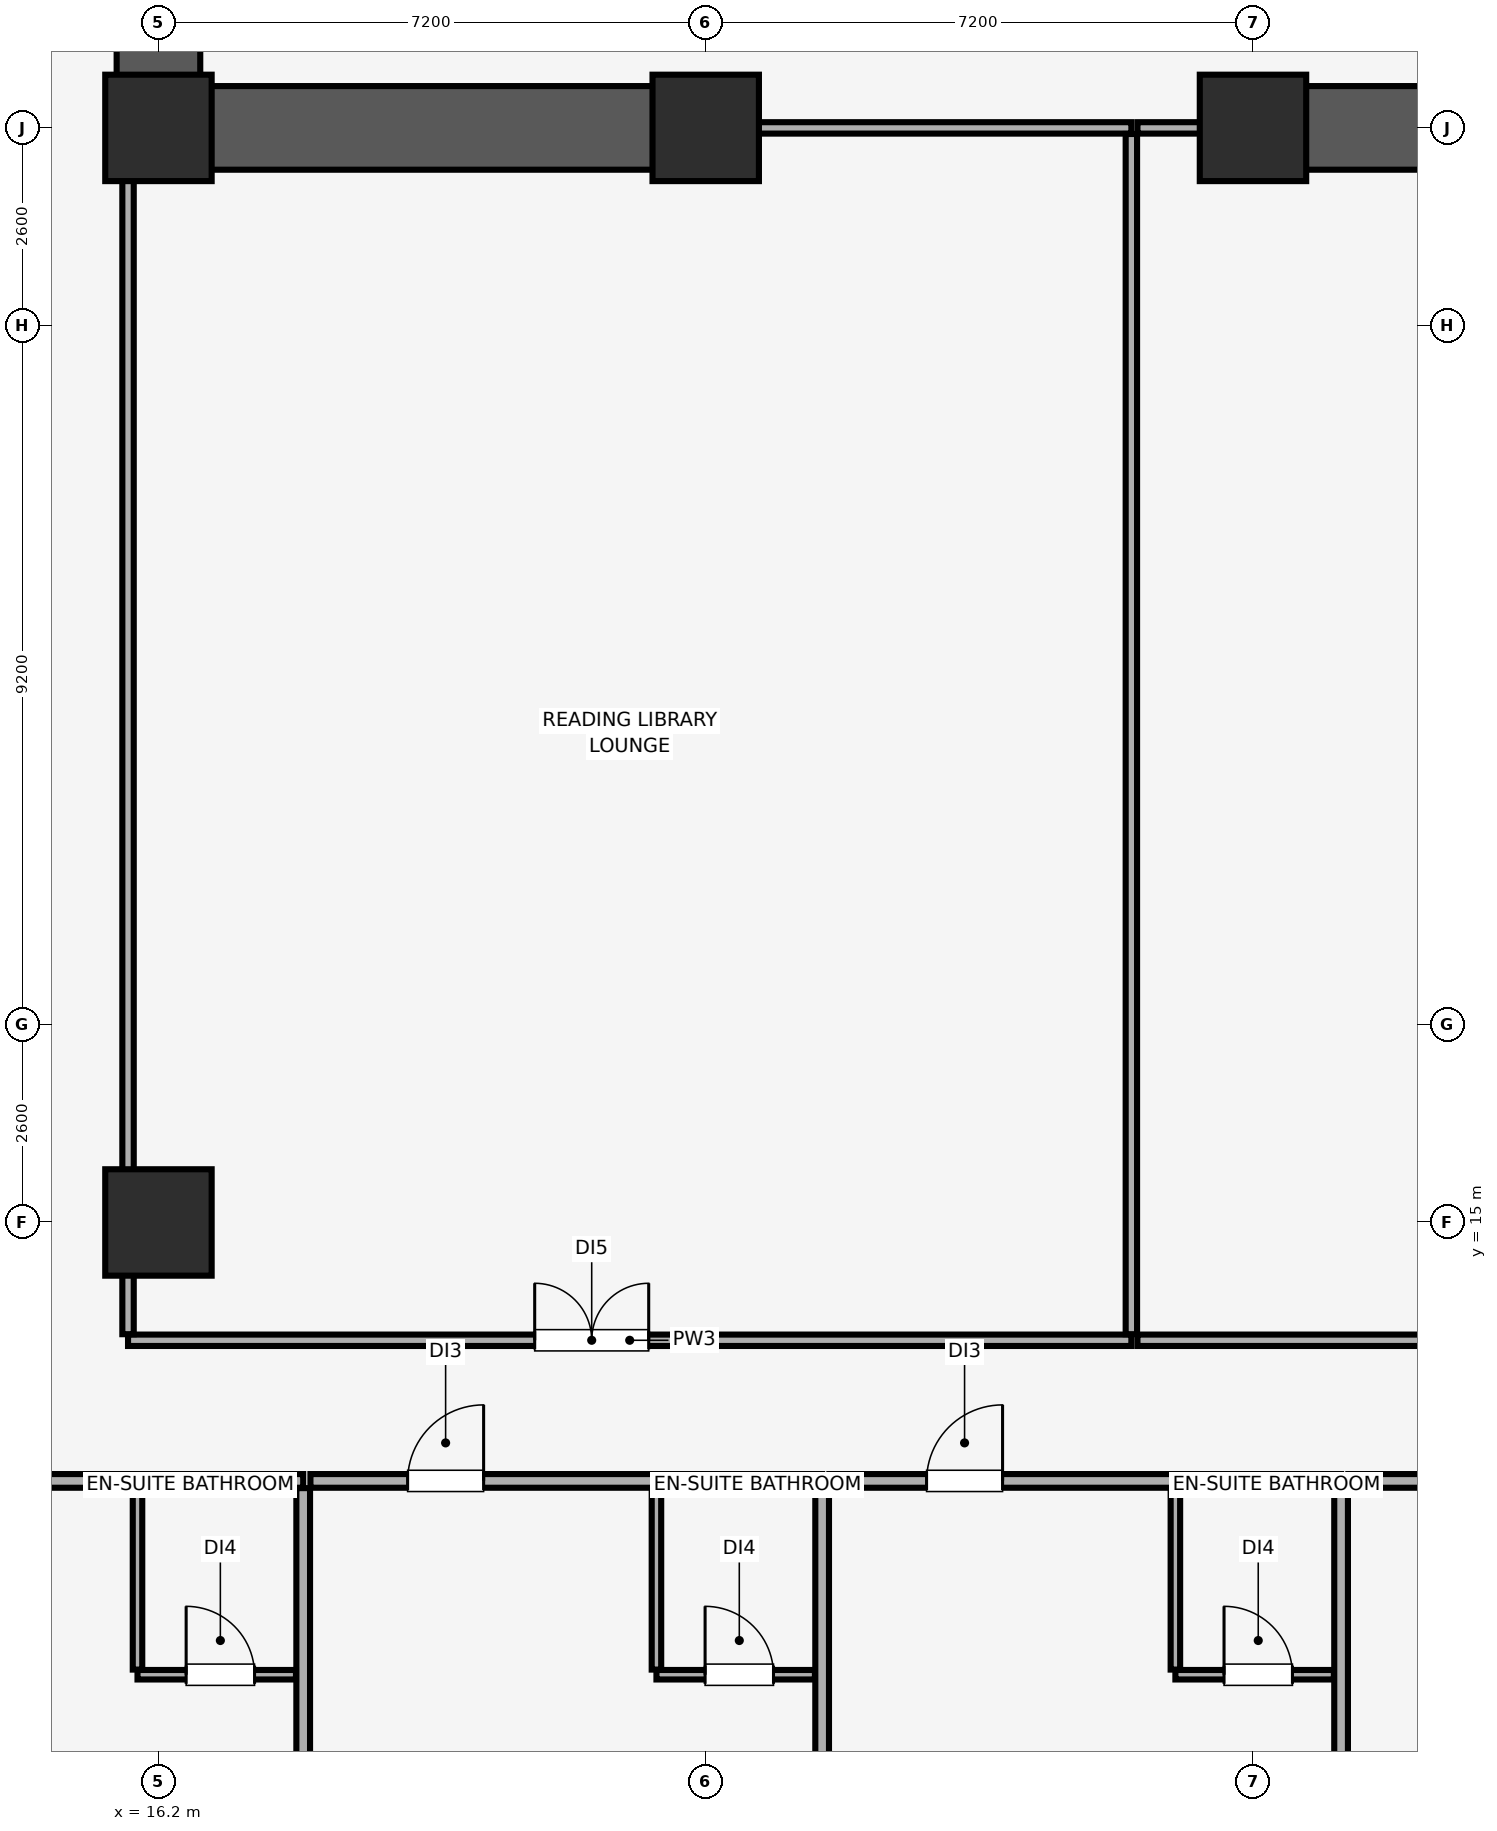
"""IFC4 building model, lengths in metres.
Left out: names, types, materials, properties, quantities, classifications, styles, units other than length and angle.
Written with IfcOpenShell. Run it as: python <this file> out.ifc"""

import sys

from ifc_helpers import new_model, si_unit, direction, frame, frame_2d, origin, origin_2d, place, context, subcontext, project, spatial, rectangle, extrude, element, fill, save


model = new_model("IFC4")
c1 = context("Model", 3, precision=1e-05, world=origin(), true_north=direction((0.0, 1.0)))
c2 = subcontext(c1, "Body", "Model", "MODEL_VIEW")
j1 = project(units=[si_unit("LENGTHUNIT", "METRE"), si_unit("PLANEANGLEUNIT", "RADIAN")], contexts=[c1])
p1 = place(None, origin())
s1 = spatial("IfcSite", under=j1, at=p1, CompositionType="ELEMENT")
p2 = place(p1, origin())
s2 = spatial("IfcBuilding", under=s1, at=p2, CompositionType="ELEMENT")
p3 = place(p2, frame((0.0, 0.0, 57.65)))
s3 = spatial("IfcBuildingStorey", under=s2, at=p3, CompositionType="ELEMENT", Elevation=57.65)
for number, where, z_axis, x_axis in (
    (1, (16.2, 15.0, 0.0), (0.0, 0.0, 1.0), (1.0, 0.0, 0.0)),
    (2, (16.2, 29.4, 0.0), (0.0, 0.0, 1.0), (1.0, 0.0, 0.0)),
    (3, (23.4, 29.4, 0.0), (0.0, 0.0, 1.0), (1.0, 0.0, 0.0)),
    (4, (30.6, 29.4, 0.0), (0.0, 0.0, 1.0), (1.0, 0.0, 0.0)),
):
    element("IfcColumn", number, at=place(p3, frame(where, z_axis=z_axis, x_axis=x_axis)), inside=s3, PredefinedType="COLUMN", context=c2, shape_type="SweptSolid", body=[
        extrude(rectangle(XDim=1.4, YDim=1.4, at=origin_2d()), origin(), (0.0, 0.0, 1.0), 3.51),
    ])
p4 = place(p3, frame((16.2, 29.4, 0.0), z_axis=(0.0, 0.0, 1.0), x_axis=(0.0, 1.0, 0.0)))
e5 = element("IfcWall", 5, at=p4, inside=s3, PredefinedType="SHEAR", context=c2, shape_type="SweptSolid", body=[
    extrude(rectangle(XDim=19.2, YDim=1.1, at=frame_2d((9.6, 0.0))), origin(), (0.0, 0.0, 1.0), 3.51),
])
p5 = place(p3, frame((16.755, 29.4, 0.0), z_axis=(0.0, 0.0, 1.0), x_axis=(1.0, 0.0, 0.0)))
e6 = element("IfcWall", 6, at=p5, inside=s3, PredefinedType="SHEAR", context=c2, shape_type="SweptSolid", body=[
    extrude(rectangle(XDim=6.845, YDim=1.1, at=frame_2d((3.423, 0.0))), origin(), (0.0, 0.0, 1.0), 3.51),
])
p6 = place(p3, frame((30.4, 29.4, 0.0), z_axis=(0.0, 0.0, 1.0), x_axis=(1.0, 0.0, 0.0)))
e7 = element("IfcWall", 7, at=p6, inside=s3, PredefinedType="SHEAR", context=c2, shape_type="SweptSolid", body=[
    extrude(rectangle(XDim=7.6, YDim=1.1, at=frame_2d((3.8, 0.0))), origin(), (0.0, 0.0, 1.0), 3.51),
])
p7 = place(p3, frame((11.372, 11.6, 0.0), z_axis=(0.0, 0.0, 1.0), x_axis=(1.0, 0.0, 0.0)))
e8 = element("IfcWall", 8, at=p7, inside=s3, PredefinedType="PARTITIONING", context=c2, shape_type="SweptSolid", body=[
    extrude(rectangle(XDim=6.732, YDim=0.18, at=frame_2d((3.366, 0.0))), origin(), (0.0, 0.0, 1.0), 3.51),
])
p8 = place(p7, frame((1.279, 0.0, 0.0)))
e9 = element("IfcOpeningElement", 9, at=p8, cuts=e8, PredefinedType="OPENING", context=c2, shape_type="SweptSolid", body=[
    extrude(rectangle(XDim=1.0, YDim=2.15, at=frame_2d((0.5, 1.075))), frame((0.0, 0.1, 0.0), z_axis=(0.0, -1.0, 0.0), x_axis=(1.0, 0.0, 0.0)), (0.0, 0.0, 1.0), 0.2),
])
p9 = place(p3, frame((18.104, 0.15, 0.0), z_axis=(0.0, 0.0, 1.0), x_axis=(0.0, 1.0, 0.0)))
e10 = element("IfcWall", 10, at=p9, inside=s3, PredefinedType="PARTITIONING", context=c2, shape_type="SweptSolid", body=[
    extrude(rectangle(XDim=11.355, YDim=0.18, at=frame_2d((5.677, 0.0))), origin(), (0.0, 0.0, 1.0), 3.51),
])
p10 = place(p3, frame((15.925, 9.05, 0.0), z_axis=(0.0, 0.0, 1.0), x_axis=(1.0, 0.0, 0.0)))
e11 = element("IfcWall", 11, at=p10, inside=s3, PredefinedType="PARTITIONING", context=c2, shape_type="SweptSolid", body=[
    extrude(rectangle(XDim=2.085, YDim=0.125, at=frame_2d((1.042, 0.0))), origin(), (0.0, 0.0, 1.0), 3.51),
])
p11 = place(p10, frame((0.64, 0.0, 0.0)))
e12 = element("IfcOpeningElement", 12, at=p11, cuts=e11, PredefinedType="OPENING", context=c2, shape_type="SweptSolid", body=[
    extrude(rectangle(XDim=0.9, YDim=2.1, at=frame_2d((0.45, 1.05))), frame((0.0, 0.073, 0.0), z_axis=(0.0, -1.0, 0.0), x_axis=(1.0, 0.0, 0.0)), (0.0, 0.0, 1.0), 0.145),
])
p12 = place(p3, frame((15.925, 9.117, 0.0), z_axis=(0.0, 0.0, 1.0), x_axis=(0.0, 1.0, 0.0)))
e13 = element("IfcWall", 13, at=p12, inside=s3, PredefinedType="PARTITIONING", context=c2, shape_type="SweptSolid", body=[
    extrude(rectangle(XDim=2.387, YDim=0.125, at=frame_2d((1.194, 0.0))), origin(), (0.0, 0.0, 1.0), 3.51),
])
p13 = place(p3, frame((18.199, 11.6, 0.0), z_axis=(0.0, 0.0, 1.0), x_axis=(1.0, 0.0, 0.0)))
e14 = element("IfcWall", 14, at=p13, inside=s3, PredefinedType="PARTITIONING", context=c2, shape_type="SweptSolid", body=[
    extrude(rectangle(XDim=6.732, YDim=0.18, at=frame_2d((3.366, 0.0))), origin(), (0.0, 0.0, 1.0), 3.51),
])
p14 = place(p13, frame((1.279, 0.0, 0.0)))
e15 = element("IfcOpeningElement", 15, at=p14, cuts=e14, PredefinedType="OPENING", context=c2, shape_type="SweptSolid", body=[
    extrude(rectangle(XDim=1.0, YDim=2.15, at=frame_2d((0.5, 1.075))), frame((0.0, 0.1, 0.0), z_axis=(0.0, -1.0, 0.0), x_axis=(1.0, 0.0, 0.0)), (0.0, 0.0, 1.0), 0.2),
])
p15 = place(p3, frame((24.932, 0.15, 0.0), z_axis=(0.0, 0.0, 1.0), x_axis=(0.0, 1.0, 0.0)))
e16 = element("IfcWall", 16, at=p15, inside=s3, PredefinedType="PARTITIONING", context=c2, shape_type="SweptSolid", body=[
    extrude(rectangle(XDim=11.355, YDim=0.18, at=frame_2d((5.677, 0.0))), origin(), (0.0, 0.0, 1.0), 3.51),
])
p16 = place(p3, frame((22.752, 9.05, 0.0), z_axis=(0.0, 0.0, 1.0), x_axis=(1.0, 0.0, 0.0)))
e17 = element("IfcWall", 17, at=p16, inside=s3, PredefinedType="PARTITIONING", context=c2, shape_type="SweptSolid", body=[
    extrude(rectangle(XDim=2.085, YDim=0.125, at=frame_2d((1.042, 0.0))), origin(), (0.0, 0.0, 1.0), 3.51),
])
p17 = place(p16, frame((0.64, 0.0, 0.0)))
e18 = element("IfcOpeningElement", 18, at=p17, cuts=e17, PredefinedType="OPENING", context=c2, shape_type="SweptSolid", body=[
    extrude(rectangle(XDim=0.9, YDim=2.1, at=frame_2d((0.45, 1.05))), frame((0.0, 0.073, 0.0), z_axis=(0.0, -1.0, 0.0), x_axis=(1.0, 0.0, 0.0)), (0.0, 0.0, 1.0), 0.145),
])
p18 = place(p3, frame((22.752, 9.117, 0.0), z_axis=(0.0, 0.0, 1.0), x_axis=(0.0, 1.0, 0.0)))
e19 = element("IfcWall", 19, at=p18, inside=s3, PredefinedType="PARTITIONING", context=c2, shape_type="SweptSolid", body=[
    extrude(rectangle(XDim=2.387, YDim=0.125, at=frame_2d((1.194, 0.0))), origin(), (0.0, 0.0, 1.0), 3.51),
])
p19 = place(p3, frame((25.027, 11.6, 0.0), z_axis=(0.0, 0.0, 1.0), x_axis=(1.0, 0.0, 0.0)))
e20 = element("IfcWall", 20, at=p19, inside=s3, PredefinedType="PARTITIONING", context=c2, shape_type="SweptSolid", body=[
    extrude(rectangle(XDim=6.732, YDim=0.18, at=frame_2d((3.366, 0.0))), origin(), (0.0, 0.0, 1.0), 3.51),
])
p20 = place(p19, frame((1.279, 0.0, 0.0)))
e21 = element("IfcOpeningElement", 21, at=p20, cuts=e20, PredefinedType="OPENING", context=c2, shape_type="SweptSolid", body=[
    extrude(rectangle(XDim=1.0, YDim=2.15, at=frame_2d((0.5, 1.075))), frame((0.0, 0.1, 0.0), z_axis=(0.0, -1.0, 0.0), x_axis=(1.0, 0.0, 0.0)), (0.0, 0.0, 1.0), 0.2),
])
p21 = place(p3, frame((31.759, 0.15, 0.0), z_axis=(0.0, 0.0, 1.0), x_axis=(0.0, 1.0, 0.0)))
e22 = element("IfcWall", 22, at=p21, inside=s3, PredefinedType="PARTITIONING", context=c2, shape_type="SweptSolid", body=[
    extrude(rectangle(XDim=11.355, YDim=0.18, at=frame_2d((5.677, 0.0))), origin(), (0.0, 0.0, 1.0), 3.51),
])
p22 = place(p3, frame((29.579, 9.05, 0.0), z_axis=(0.0, 0.0, 1.0), x_axis=(1.0, 0.0, 0.0)))
e23 = element("IfcWall", 23, at=p22, inside=s3, PredefinedType="PARTITIONING", context=c2, shape_type="SweptSolid", body=[
    extrude(rectangle(XDim=2.085, YDim=0.125, at=frame_2d((1.042, 0.0))), origin(), (0.0, 0.0, 1.0), 3.51),
])
p23 = place(p22, frame((0.64, 0.0, 0.0)))
e24 = element("IfcOpeningElement", 24, at=p23, cuts=e23, PredefinedType="OPENING", context=c2, shape_type="SweptSolid", body=[
    extrude(rectangle(XDim=0.9, YDim=2.1, at=frame_2d((0.45, 1.05))), frame((0.0, 0.073, 0.0), z_axis=(0.0, -1.0, 0.0), x_axis=(1.0, 0.0, 0.0)), (0.0, 0.0, 1.0), 0.145),
])
p24 = place(p3, frame((29.579, 9.117, 0.0), z_axis=(0.0, 0.0, 1.0), x_axis=(0.0, 1.0, 0.0)))
e25 = element("IfcWall", 25, at=p24, inside=s3, PredefinedType="PARTITIONING", context=c2, shape_type="SweptSolid", body=[
    extrude(rectangle(XDim=2.387, YDim=0.125, at=frame_2d((1.194, 0.0))), origin(), (0.0, 0.0, 1.0), 3.51),
])
p25 = place(p3, frame((31.854, 11.6, 0.0), z_axis=(0.0, 0.0, 1.0), x_axis=(1.0, 0.0, 0.0)))
e26 = element("IfcWall", 26, at=p25, inside=s3, PredefinedType="PARTITIONING", context=c2, shape_type="SweptSolid", body=[
    extrude(rectangle(XDim=6.732, YDim=0.18, at=frame_2d((3.366, 0.0))), origin(), (0.0, 0.0, 1.0), 3.51),
])
p26 = place(p25, frame((1.279, 0.0, 0.0)))
e27 = element("IfcOpeningElement", 27, at=p26, cuts=e26, PredefinedType="OPENING", context=c2, shape_type="SweptSolid", body=[
    extrude(rectangle(XDim=1.0, YDim=2.15, at=frame_2d((0.5, 1.075))), frame((0.0, 0.1, 0.0), z_axis=(0.0, -1.0, 0.0), x_axis=(1.0, 0.0, 0.0)), (0.0, 0.0, 1.0), 0.2),
])
p27 = place(p3, frame((15.8, 13.45, 0.0), z_axis=(0.0, 0.0, 1.0), x_axis=(1.0, 0.0, 0.0)))
e28 = element("IfcWall", 28, at=p27, inside=s3, PredefinedType="PARTITIONING", context=c2, shape_type="SweptSolid", body=[
    extrude(rectangle(XDim=13.2, YDim=0.15, at=frame_2d((6.6, 0.0))), origin(), (0.0, 0.0, 1.0), 3.51),
])
p28 = place(p27, frame((5.35, 0.0, 0.0)))
e29 = element("IfcOpeningElement", 29, at=p28, cuts=e28, PredefinedType="OPENING", context=c2, shape_type="SweptSolid", body=[
    extrude(rectangle(XDim=1.5, YDim=2.25, at=frame_2d((0.75, 1.125))), frame((0.0, 0.085, 0.0), z_axis=(0.0, -1.0, 0.0), x_axis=(1.0, 0.0, 0.0)), (0.0, 0.0, 1.0), 0.17),
])
p29 = place(p3, frame((23.61, 29.4, 0.0), z_axis=(0.0, 0.0, 1.0), x_axis=(1.0, 0.0, 0.0)))
e30 = element("IfcWall", 30, at=p29, inside=s3, PredefinedType="PARTITIONING", context=c2, shape_type="SweptSolid", body=[
    extrude(rectangle(XDim=5.39, YDim=0.15, at=frame_2d((2.695, 0.0))), origin(), (0.0, 0.0, 1.0), 2.41),
])
p30 = place(p3, frame((15.8, 13.53, 0.0), z_axis=(0.0, 0.0, 1.0), x_axis=(0.0, 1.0, 0.0)))
e31 = element("IfcWall", 31, at=p30, inside=s3, PredefinedType="PARTITIONING", context=c2, shape_type="SweptSolid", body=[
    extrude(rectangle(XDim=15.86, YDim=0.15, at=frame_2d((7.93, 0.0))), origin(), (0.0, 0.0, 1.0), 3.51),
])
p31 = place(p3, frame((29.0, 13.53, 0.0), z_axis=(0.0, 0.0, 1.0), x_axis=(0.0, 1.0, 0.0)))
e32 = element("IfcWall", 32, at=p31, inside=s3, PredefinedType="PARTITIONING", context=c2, shape_type="SweptSolid", body=[
    extrude(rectangle(XDim=15.79, YDim=0.15, at=frame_2d((7.895, 0.0))), origin(), (0.0, 0.0, 1.0), 3.51),
])
p32 = place(p3, frame((29.08, 13.45, 0.0), z_axis=(0.0, 0.0, 1.0), x_axis=(1.0, 0.0, 0.0)))
e33 = element("IfcWall", 33, at=p32, inside=s3, PredefinedType="PARTITIONING", context=c2, shape_type="SweptSolid", body=[
    extrude(rectangle(XDim=10.72, YDim=0.15, at=frame_2d((5.36, 0.0))), origin(), (0.0, 0.0, 1.0), 3.51),
])
p33 = place(p32, frame((4.82, 0.0, 0.0)))
e34 = element("IfcOpeningElement", 34, at=p33, cuts=e33, PredefinedType="OPENING", context=c2, shape_type="SweptSolid", body=[
    extrude(rectangle(XDim=1.0, YDim=2.15, at=frame_2d((0.5, 1.075))), frame((0.0, 0.085, 0.0), z_axis=(0.0, -1.0, 0.0), x_axis=(1.0, 0.0, 0.0)), (0.0, 0.0, 1.0), 0.17),
])
p34 = place(p3, frame((29.08, 29.4, 0.0), z_axis=(0.0, 0.0, 1.0), x_axis=(1.0, 0.0, 0.0)))
e35 = element("IfcWall", 35, at=p34, inside=s3, PredefinedType="PARTITIONING", context=c2, shape_type="SweptSolid", body=[
    extrude(rectangle(XDim=1.31, YDim=0.15, at=frame_2d((0.655, 0.0))), origin(), (0.0, 0.0, 1.0), 2.41),
])
p35 = place(p11, origin())
e36 = element("IfcDoor", 36, at=p35, inside=s3, OperationType="SINGLE_SWING_LEFT", PredefinedType="DOOR", context=c2, shape_type="SweptSolid", body=[
    extrude(rectangle(XDim=0.9, YDim=2.1, at=frame_2d((0.45, 1.05))), frame((0.0, 0.025, 0.0), z_axis=(0.0, -1.0, 0.0), x_axis=(1.0, 0.0, 0.0)), (0.0, 0.0, 1.0), 0.05),
])
fill(e12, e36)
p36 = place(p14, origin())
e37 = element("IfcDoor", 37, at=p36, inside=s3, OperationType="SINGLE_SWING_RIGHT", PredefinedType="DOOR", context=c2, shape_type="SweptSolid", body=[
    extrude(rectangle(XDim=1.0, YDim=2.15, at=frame_2d((0.5, 1.075))), frame((0.0, 0.025, 0.0), z_axis=(0.0, -1.0, 0.0), x_axis=(1.0, 0.0, 0.0)), (0.0, 0.0, 1.0), 0.05),
])
fill(e15, e37)
p37 = place(p17, origin())
e38 = element("IfcDoor", 38, at=p37, inside=s3, OperationType="SINGLE_SWING_LEFT", PredefinedType="DOOR", context=c2, shape_type="SweptSolid", body=[
    extrude(rectangle(XDim=0.9, YDim=2.1, at=frame_2d((0.45, 1.05))), frame((0.0, 0.025, 0.0), z_axis=(0.0, -1.0, 0.0), x_axis=(1.0, 0.0, 0.0)), (0.0, 0.0, 1.0), 0.05),
])
fill(e18, e38)
p38 = place(p20, origin())
e39 = element("IfcDoor", 39, at=p38, inside=s3, OperationType="SINGLE_SWING_RIGHT", PredefinedType="DOOR", context=c2, shape_type="SweptSolid", body=[
    extrude(rectangle(XDim=1.0, YDim=2.15, at=frame_2d((0.5, 1.075))), frame((0.0, 0.025, 0.0), z_axis=(0.0, -1.0, 0.0), x_axis=(1.0, 0.0, 0.0)), (0.0, 0.0, 1.0), 0.05),
])
fill(e21, e39)
p39 = place(p23, origin())
e40 = element("IfcDoor", 40, at=p39, inside=s3, OperationType="SINGLE_SWING_LEFT", PredefinedType="DOOR", context=c2, shape_type="SweptSolid", body=[
    extrude(rectangle(XDim=0.9, YDim=2.1, at=frame_2d((0.45, 1.05))), frame((0.0, 0.025, 0.0), z_axis=(0.0, -1.0, 0.0), x_axis=(1.0, 0.0, 0.0)), (0.0, 0.0, 1.0), 0.05),
])
fill(e24, e40)
p40 = place(p28, origin())
e41 = element("IfcDoor", 41, at=p40, inside=s3, OperationType="DOUBLE_DOOR_SINGLE_SWING", PredefinedType="DOOR", context=c2, shape_type="SweptSolid", body=[
    extrude(rectangle(XDim=1.5, YDim=2.25, at=frame_2d((0.75, 1.125))), frame((0.0, 0.025, 0.0), z_axis=(0.0, -1.0, 0.0), x_axis=(1.0, 0.0, 0.0)), (0.0, 0.0, 1.0), 0.05),
])
fill(e29, e41)
save(model, sys.argv[1])
